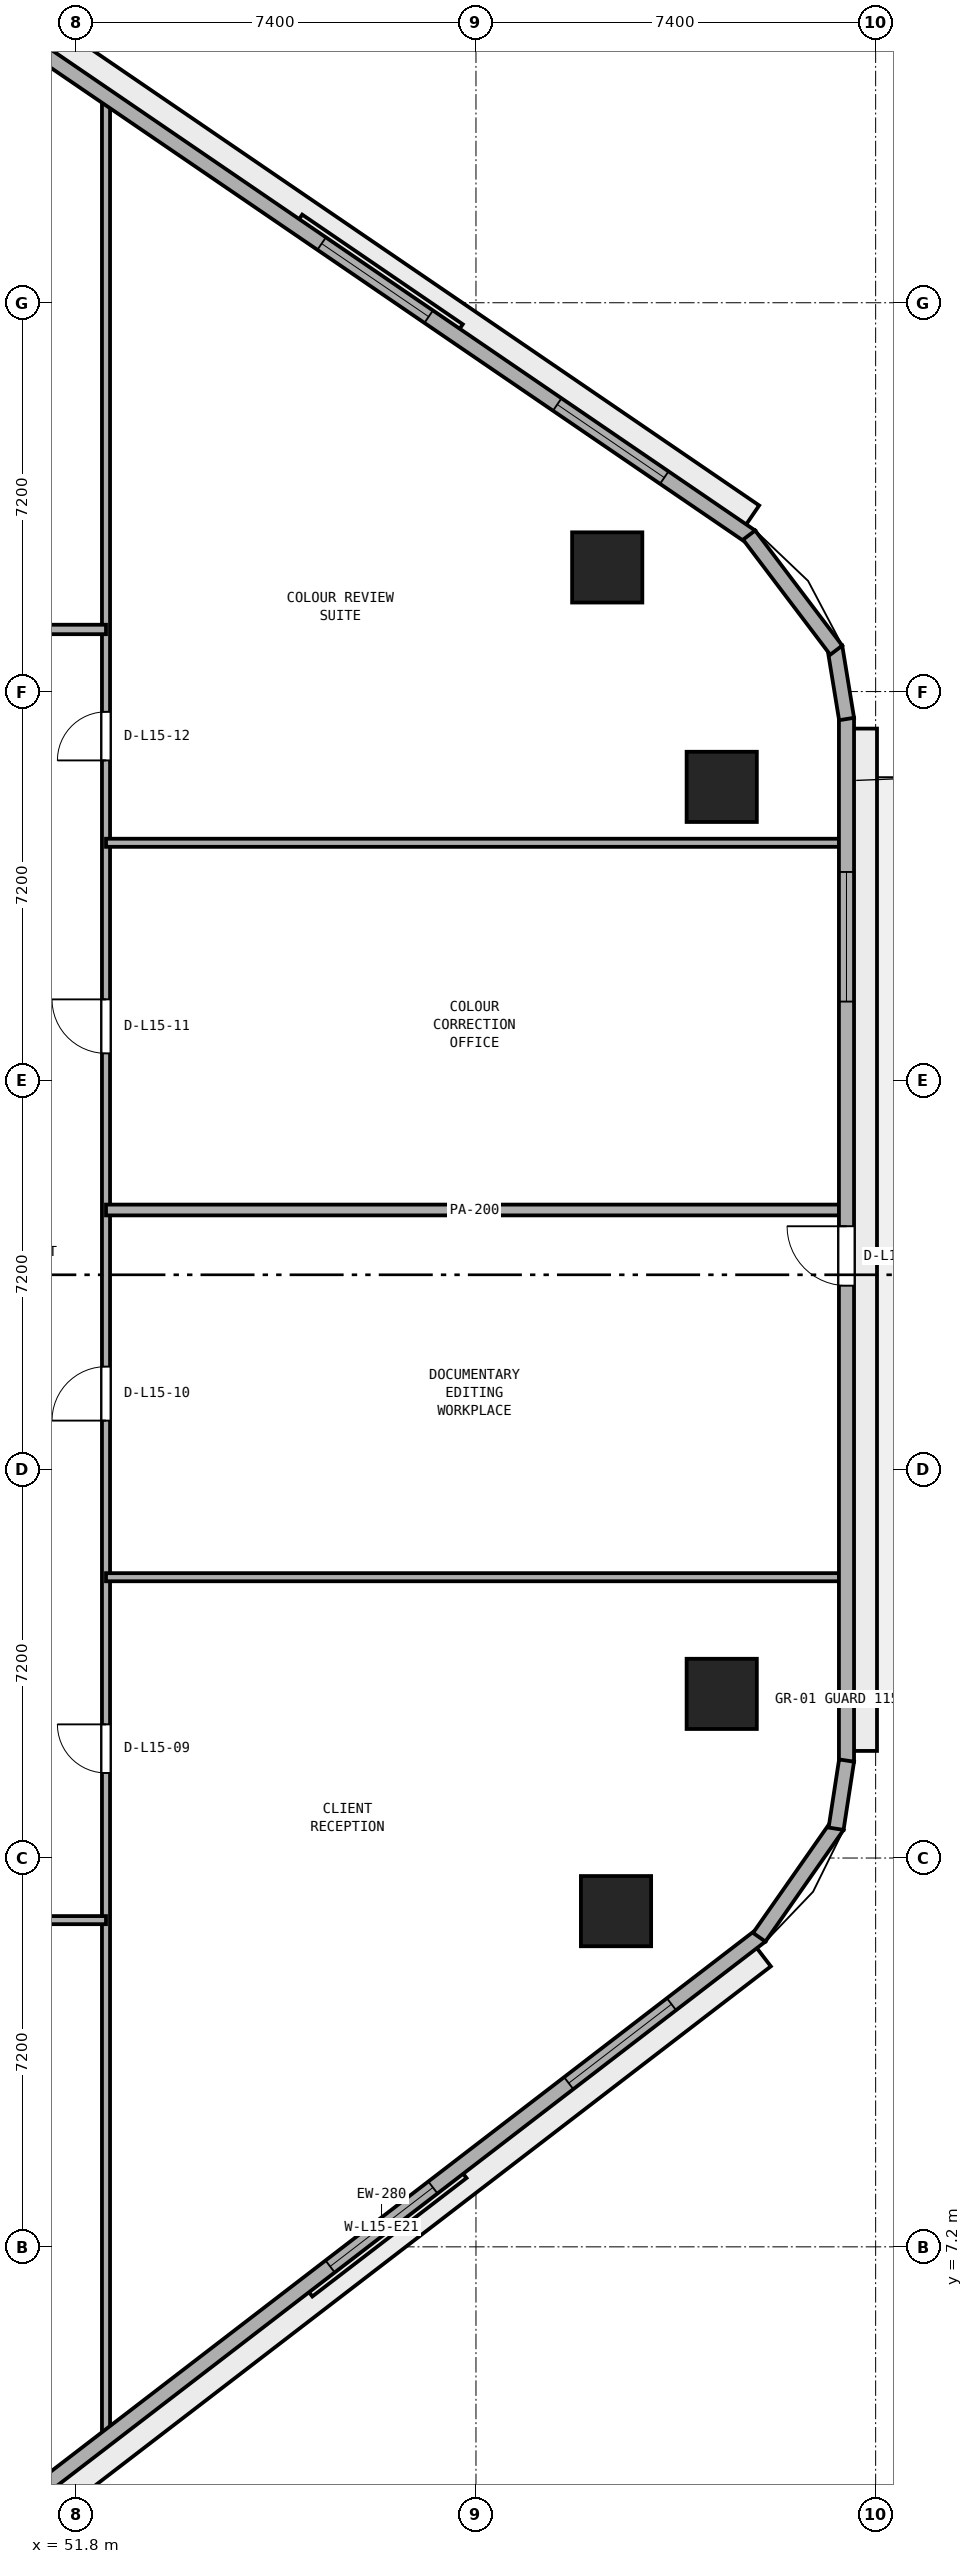
"""IFC4 building model, lengths in metres.
Left out: names, types, materials, properties, quantities, classifications, styles, units other than length and angle.
Written with IfcOpenShell. Run it as: python <this file> out.ifc"""

import sys

from ifc_helpers import new_model, si_unit, direction, frame, frame_2d, origin, origin_2d, place, context, subcontext, project, spatial, rectangle, extrude, element, fill, save


model = new_model("IFC4")
c1 = context("Model", 3, precision=1e-05, world=origin(), true_north=direction((0.0, 1.0)))
c2 = subcontext(c1, "Body", "Model", "MODEL_VIEW")
j1 = project(units=[si_unit("LENGTHUNIT", "METRE"), si_unit("PLANEANGLEUNIT", "RADIAN")], contexts=[c1])
p1 = place(None, origin())
s1 = spatial("IfcSite", under=j1, at=p1, CompositionType="ELEMENT")
p2 = place(p1, origin())
s2 = spatial("IfcBuilding", under=s1, at=p2, CompositionType="ELEMENT")
p3 = place(p2, frame((0.0, 0.0, 63.0)))
s3 = spatial("IfcBuildingStorey", under=s2, at=p3, CompositionType="ELEMENT", Elevation=63.0)
for number, where, z_axis, x_axis in (
    (1, (61.793, 13.416, 0.0), (0.0, 0.0, 1.0), (1.0, 0.0, 0.0)),
    (2, (63.75, 17.44, 0.0), (0.0, 0.0, 1.0), (1.0, 0.0, 0.0)),
    (3, (63.75, 34.235, 0.0), (0.0, 0.0, 1.0), (1.0, 0.0, 0.0)),
    (4, (61.63, 38.299, 0.0), (0.0, 0.0, 1.0), (1.0, 0.0, 0.0)),
):
    element("IfcColumn", number, at=place(p3, frame(where, z_axis=z_axis, x_axis=x_axis)), inside=s3, PredefinedType="COLUMN", context=c2, shape_type="SweptSolid", body=[
        extrude(rectangle(XDim=1.3, YDim=1.3, at=origin_2d()), origin(), (0.0, 0.0, 1.0), 3.8),
    ])
p4 = place(p3, frame((52.35, 3.611, 0.0), z_axis=(0.0, 0.0, 1.0), x_axis=(0.0, 1.0, 0.0)))
e5 = element("IfcWall", 5, at=p4, inside=s3, PredefinedType="PARTITIONING", context=c2, shape_type="SweptSolid", body=[
    extrude(rectangle(XDim=43.441, YDim=0.15, at=frame_2d((21.72, 0.0))), origin(), (0.0, 0.0, 1.0), 3.525),
])
p5 = place(p4, frame((12.364, 0.0, 0.0)))
e6 = element("IfcOpeningElement", 6, at=p5, cuts=e5, PredefinedType="OPENING", context=c2, shape_type="SweptSolid", body=[
    extrude(rectangle(XDim=0.9, YDim=2.1, at=frame_2d((0.45, 1.05))), frame((0.0, 0.085, 0.0), z_axis=(0.0, -1.0, 0.0), x_axis=(1.0, 0.0, 0.0)), (0.0, 0.0, 1.0), 0.17),
])
p6 = place(p4, frame((18.889, 0.0, 0.0)))
e7 = element("IfcOpeningElement", 7, at=p6, cuts=e5, PredefinedType="OPENING", context=c2, shape_type="SweptSolid", body=[
    extrude(rectangle(XDim=1.0, YDim=2.12, at=frame_2d((0.5, 1.06))), frame((0.0, 0.085, 0.0), z_axis=(0.0, -1.0, 0.0), x_axis=(1.0, 0.0, 0.0)), (0.0, 0.0, 1.0), 0.17),
])
p7 = place(p4, frame((25.689, 0.0, 0.0)))
e8 = element("IfcOpeningElement", 8, at=p7, cuts=e5, PredefinedType="OPENING", context=c2, shape_type="SweptSolid", body=[
    extrude(rectangle(XDim=1.0, YDim=2.12, at=frame_2d((0.5, 1.06))), frame((0.0, 0.085, 0.0), z_axis=(0.0, -1.0, 0.0), x_axis=(1.0, 0.0, 0.0)), (0.0, 0.0, 1.0), 0.17),
])
p8 = place(p4, frame((31.114, 0.0, 0.0)))
e9 = element("IfcOpeningElement", 9, at=p8, cuts=e5, PredefinedType="OPENING", context=c2, shape_type="SweptSolid", body=[
    extrude(rectangle(XDim=0.9, YDim=2.1, at=frame_2d((0.45, 1.05))), frame((0.0, 0.085, 0.0), z_axis=(0.0, -1.0, 0.0), x_axis=(1.0, 0.0, 0.0)), (0.0, 0.0, 1.0), 0.17),
])
p9 = place(p3, frame((21.65, 13.25, 0.0), z_axis=(0.0, 0.0, 1.0), x_axis=(1.0, 0.0, 0.0)))
e10 = element("IfcWall", 10, at=p9, inside=s3, PredefinedType="PARTITIONING", context=c2, shape_type="SweptSolid", body=[
    extrude(rectangle(XDim=30.7, YDim=0.15, at=frame_2d((15.35, 0.0))), origin(), (0.0, 0.0, 1.0), 3.525),
])
p10 = place(p9, frame((3.695, 0.0, 0.0)))
e11 = element("IfcOpeningElement", 11, at=p10, cuts=e10, PredefinedType="OPENING", context=c2, shape_type="SweptSolid", body=[
    extrude(rectangle(XDim=0.9, YDim=2.1, at=frame_2d((0.45, 1.05))), frame((0.0, 0.085, 0.0), z_axis=(0.0, -1.0, 0.0), x_axis=(1.0, 0.0, 0.0)), (0.0, 0.0, 1.0), 0.17),
])
p11 = place(p9, frame((11.95, 0.0, 0.0)))
e12 = element("IfcOpeningElement", 12, at=p11, cuts=e10, PredefinedType="OPENING", context=c2, shape_type="SweptSolid", body=[
    extrude(rectangle(XDim=0.9, YDim=2.1, at=frame_2d((0.45, 1.05))), frame((0.0, 0.085, 0.0), z_axis=(0.0, -1.0, 0.0), x_axis=(1.0, 0.0, 0.0)), (0.0, 0.0, 1.0), 0.17),
])
p12 = place(p9, frame((20.45, 0.0, 0.0)))
e13 = element("IfcOpeningElement", 13, at=p12, cuts=e10, PredefinedType="OPENING", context=c2, shape_type="SweptSolid", body=[
    extrude(rectangle(XDim=0.9, YDim=2.1, at=frame_2d((0.45, 1.05))), frame((0.0, 0.085, 0.0), z_axis=(0.0, -1.0, 0.0), x_axis=(1.0, 0.0, 0.0)), (0.0, 0.0, 1.0), 0.17),
])
p13 = place(p9, frame((27.305, 0.0, 0.0)))
e14 = element("IfcOpeningElement", 14, at=p13, cuts=e10, PredefinedType="OPENING", context=c2, shape_type="SweptSolid", body=[
    extrude(rectangle(XDim=0.9, YDim=2.1, at=frame_2d((0.45, 1.05))), frame((0.0, 0.085, 0.0), z_axis=(0.0, -1.0, 0.0), x_axis=(1.0, 0.0, 0.0)), (0.0, 0.0, 1.0), 0.17),
])
p14 = place(p3, frame((52.35, 19.6, 0.0), z_axis=(0.0, 0.0, 1.0), x_axis=(1.0, 0.0, 0.0)))
e15 = element("IfcWall", 15, at=p14, inside=s3, PredefinedType="PARTITIONING", context=c2, shape_type="SweptSolid", body=[
    extrude(rectangle(XDim=13.645, YDim=0.15, at=frame_2d((6.823, 0.0))), origin(), (0.0, 0.0, 1.0), 3.525),
])
p15 = place(p3, frame((52.35, 26.4, 0.0), z_axis=(0.0, 0.0, 1.0), x_axis=(1.0, 0.0, 0.0)))
e16 = element("IfcWall", 16, at=p15, inside=s3, PredefinedType="PARTITIONING", context=c2, shape_type="SweptSolid", body=[
    extrude(rectangle(XDim=13.645, YDim=0.2, at=frame_2d((6.823, 0.0))), origin(), (0.0, 0.0, 1.0), 3.525),
])
p16 = place(p3, frame((52.35, 33.2, 0.0), z_axis=(0.0, 0.0, 1.0), x_axis=(1.0, 0.0, 0.0)))
e17 = element("IfcWall", 17, at=p16, inside=s3, PredefinedType="PARTITIONING", context=c2, shape_type="SweptSolid", body=[
    extrude(rectangle(XDim=13.645, YDim=0.15, at=frame_2d((6.823, 0.0))), origin(), (0.0, 0.0, 1.0), 3.525),
])
p17 = place(p3, frame((21.65, 37.15, 0.0), z_axis=(0.0, 0.0, 1.0), x_axis=(1.0, 0.0, 0.0)))
e18 = element("IfcWall", 18, at=p17, inside=s3, PredefinedType="PARTITIONING", context=c2, shape_type="SweptSolid", body=[
    extrude(rectangle(XDim=30.7, YDim=0.175, at=frame_2d((15.35, 0.0))), origin(), (0.0, 0.0, 1.0), 3.525),
])
p18 = place(p17, frame((3.795, 0.0, 0.0)))
e19 = element("IfcOpeningElement", 19, at=p18, cuts=e18, PredefinedType="OPENING", context=c2, shape_type="SweptSolid", body=[
    extrude(rectangle(XDim=1.0, YDim=2.12, at=frame_2d((0.5, 1.06))), frame((0.0, 0.097, 0.0), z_axis=(0.0, -1.0, 0.0), x_axis=(1.0, 0.0, 0.0)), (0.0, 0.0, 1.0), 0.195),
])
p19 = place(p17, frame((18.905, 0.0, 0.0)))
e20 = element("IfcOpeningElement", 20, at=p19, cuts=e18, PredefinedType="OPENING", context=c2, shape_type="SweptSolid", body=[
    extrude(rectangle(XDim=1.0, YDim=2.12, at=frame_2d((0.5, 1.06))), frame((0.0, 0.097, 0.0), z_axis=(0.0, -1.0, 0.0), x_axis=(1.0, 0.0, 0.0)), (0.0, 0.0, 1.0), 0.195),
])
p20 = place(p3, frame((50.429, 2.172, 0.0), z_axis=(0.0, 0.0, 1.0), x_axis=(0.792937466367, 0.609303023488, 0.0)))
e21 = element("IfcWall", 21, at=p20, inside=s3, PredefinedType="STANDARD", context=c2, shape_type="SweptSolid", body=[
    extrude(rectangle(XDim=17.713, YDim=0.28, at=frame_2d((8.856, 0.0))), origin(), (0.0, 0.0, 1.0), 3.525),
])
p21 = place(p20, frame((7.656, 0.0, 0.9)))
e22 = element("IfcOpeningElement", 22, at=p21, cuts=e21, PredefinedType="OPENING", context=c2, shape_type="SweptSolid", body=[
    extrude(rectangle(XDim=2.4, YDim=1.75, at=frame_2d((1.2, 0.875))), frame((0.0, 0.15, 0.0), z_axis=(0.0, -1.0, 0.0), x_axis=(1.0, 0.0, 0.0)), (0.0, 0.0, 1.0), 0.3),
])
p22 = place(p20, frame((13.227, 0.0, 0.9)))
e23 = element("IfcOpeningElement", 23, at=p22, cuts=e21, PredefinedType="OPENING", context=c2, shape_type="SweptSolid", body=[
    extrude(rectangle(XDim=2.4, YDim=1.75, at=frame_2d((1.2, 0.875))), frame((0.0, 0.15, 0.0), z_axis=(0.0, -1.0, 0.0), x_axis=(1.0, 0.0, 0.0)), (0.0, 0.0, 1.0), 0.3),
])
p23 = place(p3, frame((66.06, 16.183, 0.0), z_axis=(0.0, 0.0, 1.0), x_axis=(0.0, 1.0, 0.0)))
e24 = element("IfcWall", 24, at=p23, inside=s3, PredefinedType="STANDARD", context=c2, shape_type="SweptSolid", body=[
    extrude(rectangle(XDim=19.331, YDim=0.28, at=frame_2d((9.666, 0.0))), origin(), (0.0, 0.0, 1.0), 3.525),
])
p24 = place(p23, frame((8.815, 0.0, 0.0)))
e25 = element("IfcOpeningElement", 25, at=p24, cuts=e24, PredefinedType="OPENING", context=c2, shape_type="SweptSolid", body=[
    extrude(rectangle(XDim=1.1, YDim=2.2, at=frame_2d((0.55, 1.1))), frame((0.0, 0.15, 0.0), z_axis=(0.0, -1.0, 0.0), x_axis=(1.0, 0.0, 0.0)), (0.0, 0.0, 1.0), 0.3),
])
p25 = place(p23, frame((14.076, 0.0, 0.9)))
e26 = element("IfcOpeningElement", 26, at=p25, cuts=e24, PredefinedType="OPENING", context=c2, shape_type="SweptSolid", body=[
    extrude(rectangle(XDim=2.4, YDim=1.75, at=frame_2d((1.2, 0.875))), frame((0.0, 0.15, 0.0), z_axis=(0.0, -1.0, 0.0), x_axis=(1.0, 0.0, 0.0)), (0.0, 0.0, 1.0), 0.3),
])
p26 = place(p3, frame((64.29, 38.867, 0.0), z_axis=(0.0, 0.0, 1.0), x_axis=(-0.825755550159, 0.564028165416, 0.0)))
e27 = element("IfcWall", 27, at=p26, inside=s3, PredefinedType="STANDARD", context=c2, shape_type="SweptSolid", body=[
    extrude(rectangle(XDim=16.848, YDim=0.28, at=frame_2d((8.424, 0.0))), origin(), (0.0, 0.0, 1.0), 3.525),
])
p27 = place(p26, frame((1.941, 0.0, 0.9)))
e28 = element("IfcOpeningElement", 28, at=p27, cuts=e27, PredefinedType="OPENING", context=c2, shape_type="SweptSolid", body=[
    extrude(rectangle(XDim=2.4, YDim=1.75, at=frame_2d((1.2, 0.875))), frame((0.0, 0.15, 0.0), z_axis=(0.0, -1.0, 0.0), x_axis=(1.0, 0.0, 0.0)), (0.0, 0.0, 1.0), 0.3),
])
p28 = place(p26, frame((7.224, 0.0, 0.9)))
e29 = element("IfcOpeningElement", 29, at=p28, cuts=e27, PredefinedType="OPENING", context=c2, shape_type="SweptSolid", body=[
    extrude(rectangle(XDim=2.4, YDim=1.75, at=frame_2d((1.2, 0.875))), frame((0.0, 0.15, 0.0), z_axis=(0.0, -1.0, 0.0), x_axis=(1.0, 0.0, 0.0)), (0.0, 0.0, 1.0), 0.3),
])
p29 = place(p3, frame((64.444, 12.933, 0.0), z_axis=(0.0, 0.0, 1.0), x_axis=(0.573176686443, 0.819431806875, 0.0)))
e30 = element("IfcWall", 30, at=p29, inside=s3, PredefinedType="STANDARD", context=c2, shape_type="SweptSolid", body=[
    extrude(rectangle(XDim=2.524, YDim=0.28, at=frame_2d((1.262, 0.0))), origin(), (0.0, 0.0, 1.0), 3.525),
])
p30 = place(p3, frame((65.867, 14.943, 0.0), z_axis=(0.0, 0.0, 1.0), x_axis=(0.152014078361, 0.988378328364, 0.0)))
e31 = element("IfcWall", 31, at=p30, inside=s3, PredefinedType="STANDARD", context=c2, shape_type="SweptSolid", body=[
    extrude(rectangle(XDim=1.277, YDim=0.28, at=frame_2d((0.638, 0.0))), origin(), (0.0, 0.0, 1.0), 3.525),
])
p31 = place(p3, frame((66.062, 35.492, 0.0), z_axis=(0.0, 0.0, 1.0), x_axis=(-0.161182073582, 0.986924687682, 0.0)))
e32 = element("IfcWall", 32, at=p31, inside=s3, PredefinedType="STANDARD", context=c2, shape_type="SweptSolid", body=[
    extrude(rectangle(XDim=1.354, YDim=0.28, at=frame_2d((0.677, 0.0))), origin(), (0.0, 0.0, 1.0), 3.525),
])
p32 = place(p3, frame((65.87, 36.767, 0.0), z_axis=(0.0, 0.0, 1.0), x_axis=(-0.603370463754, 0.797461023166, 0.0)))
e33 = element("IfcWall", 33, at=p32, inside=s3, PredefinedType="STANDARD", context=c2, shape_type="SweptSolid", body=[
    extrude(rectangle(XDim=2.673, YDim=0.28, at=frame_2d((1.336, 0.0))), origin(), (0.0, 0.0, 1.0), 3.525),
])
p33 = place(p5, origin())
e34 = element("IfcDoor", 34, at=p33, inside=s3, OperationType="SINGLE_SWING_RIGHT", PredefinedType="DOOR", context=c2, shape_type="SweptSolid", body=[
    extrude(rectangle(XDim=0.9, YDim=2.1, at=frame_2d((0.45, 1.05))), frame((0.0, 0.025, 0.0), z_axis=(0.0, -1.0, 0.0), x_axis=(1.0, 0.0, 0.0)), (0.0, 0.0, 1.0), 0.05),
])
fill(e6, e34)
p34 = place(p6, origin())
e35 = element("IfcDoor", 35, at=p34, inside=s3, OperationType="SINGLE_SWING_LEFT", PredefinedType="DOOR", context=c2, shape_type="SweptSolid", body=[
    extrude(rectangle(XDim=1.0, YDim=2.12, at=frame_2d((0.5, 1.06))), frame((0.0, 0.025, 0.0), z_axis=(0.0, -1.0, 0.0), x_axis=(1.0, 0.0, 0.0)), (0.0, 0.0, 1.0), 0.05),
])
fill(e7, e35)
p35 = place(p7, origin())
e36 = element("IfcDoor", 36, at=p35, inside=s3, OperationType="SINGLE_SWING_RIGHT", PredefinedType="DOOR", context=c2, shape_type="SweptSolid", body=[
    extrude(rectangle(XDim=1.0, YDim=2.12, at=frame_2d((0.5, 1.06))), frame((0.0, 0.025, 0.0), z_axis=(0.0, -1.0, 0.0), x_axis=(1.0, 0.0, 0.0)), (0.0, 0.0, 1.0), 0.05),
])
fill(e8, e36)
p36 = place(p8, origin())
e37 = element("IfcDoor", 37, at=p36, inside=s3, OperationType="SINGLE_SWING_LEFT", PredefinedType="DOOR", context=c2, shape_type="SweptSolid", body=[
    extrude(rectangle(XDim=0.9, YDim=2.1, at=frame_2d((0.45, 1.05))), frame((0.0, 0.025, 0.0), z_axis=(0.0, -1.0, 0.0), x_axis=(1.0, 0.0, 0.0)), (0.0, 0.0, 1.0), 0.05),
])
fill(e9, e37)
p37 = place(p21, origin())
e38 = element("IfcWindow", 38, at=p37, inside=s3, PartitioningType="SINGLE_PANEL", PredefinedType="WINDOW", context=c2, shape_type="SweptSolid", body=[
    extrude(rectangle(XDim=2.4, YDim=1.75, at=frame_2d((1.2, 0.875))), frame((0.0, 0.03, 0.0), z_axis=(0.0, -1.0, 0.0), x_axis=(1.0, 0.0, 0.0)), (0.0, 0.0, 1.0), 0.06),
])
fill(e22, e38)
p38 = place(p22, origin())
e39 = element("IfcWindow", 39, at=p38, inside=s3, PartitioningType="SINGLE_PANEL", PredefinedType="WINDOW", context=c2, shape_type="SweptSolid", body=[
    extrude(rectangle(XDim=2.4, YDim=1.75, at=frame_2d((1.2, 0.875))), frame((0.0, 0.03, 0.0), z_axis=(0.0, -1.0, 0.0), x_axis=(1.0, 0.0, 0.0)), (0.0, 0.0, 1.0), 0.06),
])
fill(e23, e39)
p39 = place(p24, origin())
e40 = element("IfcDoor", 40, at=p39, inside=s3, OperationType="SINGLE_SWING_RIGHT", PredefinedType="DOOR", context=c2, shape_type="SweptSolid", body=[
    extrude(rectangle(XDim=1.1, YDim=2.2, at=frame_2d((0.55, 1.1))), frame((0.0, 0.025, 0.0), z_axis=(0.0, -1.0, 0.0), x_axis=(1.0, 0.0, 0.0)), (0.0, 0.0, 1.0), 0.05),
])
fill(e25, e40)
p40 = place(p25, origin())
e41 = element("IfcWindow", 41, at=p40, inside=s3, PartitioningType="SINGLE_PANEL", PredefinedType="WINDOW", context=c2, shape_type="SweptSolid", body=[
    extrude(rectangle(XDim=2.4, YDim=1.75, at=frame_2d((1.2, 0.875))), frame((0.0, 0.03, 0.0), z_axis=(0.0, -1.0, 0.0), x_axis=(1.0, 0.0, 0.0)), (0.0, 0.0, 1.0), 0.06),
])
fill(e26, e41)
p41 = place(p27, origin())
e42 = element("IfcWindow", 42, at=p41, inside=s3, PartitioningType="SINGLE_PANEL", PredefinedType="WINDOW", context=c2, shape_type="SweptSolid", body=[
    extrude(rectangle(XDim=2.4, YDim=1.75, at=frame_2d((1.2, 0.875))), frame((0.0, 0.03, 0.0), z_axis=(0.0, -1.0, 0.0), x_axis=(1.0, 0.0, 0.0)), (0.0, 0.0, 1.0), 0.06),
])
fill(e28, e42)
p42 = place(p28, origin())
e43 = element("IfcWindow", 43, at=p42, inside=s3, PartitioningType="SINGLE_PANEL", PredefinedType="WINDOW", context=c2, shape_type="SweptSolid", body=[
    extrude(rectangle(XDim=2.4, YDim=1.75, at=frame_2d((1.2, 0.875))), frame((0.0, 0.03, 0.0), z_axis=(0.0, -1.0, 0.0), x_axis=(1.0, 0.0, 0.0)), (0.0, 0.0, 1.0), 0.06),
])
fill(e29, e43)
save(model, sys.argv[1])
